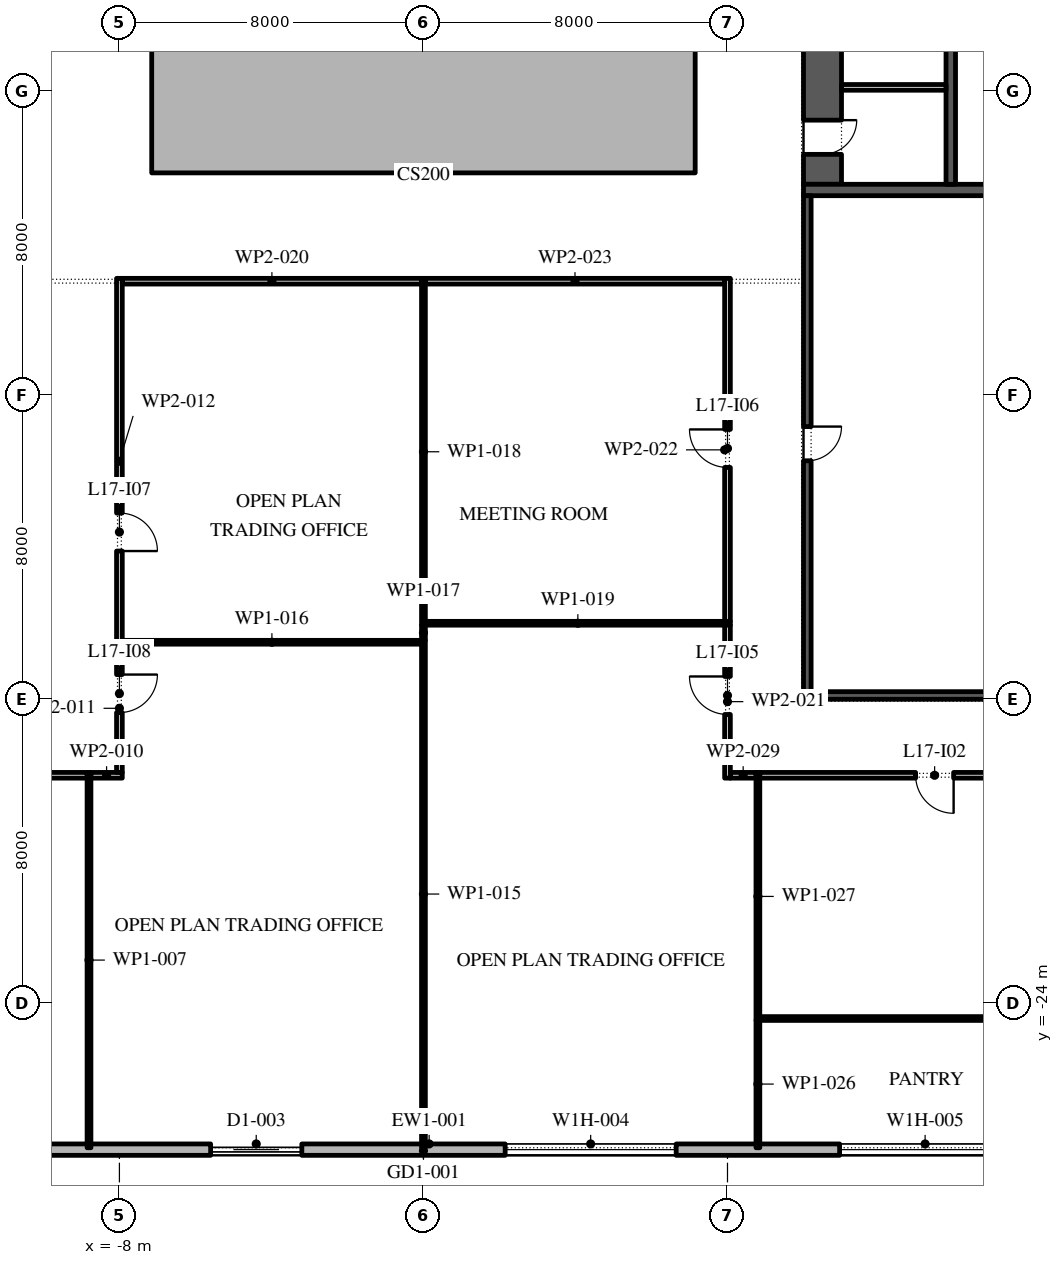
"""IFC4 building model, lengths in metres.
Left out: names, types, materials, properties, quantities, classifications, styles, units other than length and angle.
Written with IfcOpenShell. Run it as: python <this file> out.ifc"""

import sys

from ifc_helpers import new_model, si_unit, direction, frame, frame_2d, origin, place, context, subcontext, project, spatial, polyline, rectangle, outline, extrude, element, fill, save


model = new_model("IFC4")
c1 = context("Model", 3, precision=1e-05, world=origin(), true_north=direction((0.0, 1.0)))
c2 = subcontext(c1, "Body", "Model", "MODEL_VIEW")
j1 = project(units=[si_unit("LENGTHUNIT", "METRE"), si_unit("PLANEANGLEUNIT", "RADIAN")], contexts=[c1])
p1 = place(None, origin())
s1 = spatial("IfcSite", under=j1, at=p1, CompositionType="ELEMENT")
p2 = place(p1, origin())
s2 = spatial("IfcBuilding", under=s1, at=p2, CompositionType="ELEMENT")
p3 = place(p2, frame((0.0, 0.0, 81.6)))
s3 = spatial("IfcBuildingStorey", under=s2, at=p3, CompositionType="ELEMENT", Elevation=81.6)
p4 = place(p3, origin())
e1 = element("IfcWall", 1, at=p4, inside=s3, PredefinedType="STANDARD", context=c2, shape_type="SweptSolid", body=[
    extrude(outline(polyline([(-7.15, -2.15), (7.15, -2.15), (7.15, 16.15), (-7.15, 16.15), (-7.15, -2.15)]), holes=[polyline([(-7.0, -2.0), (-7.0, 16.0), (7.0, 16.0), (7.0, -2.0), (-7.0, -2.0)])]), origin(), (0.0, 0.0, 1.0), 4.0),
])
p5 = place(p3, frame((-26.1, -27.85, 0.0), z_axis=(0.0, 0.0, 1.0), x_axis=(1.0, 0.0, 0.0)))
e2 = element("IfcWall", 2, at=p5, inside=s3, PredefinedType="STANDARD", context=c2, shape_type="SweptSolid", body=[
    extrude(rectangle(XDim=52.5, YDim=0.3, at=frame_2d((26.25, 0.0))), origin(), (0.0, 0.0, 1.0), 4.0),
])
p6 = place(p5, frame((2.0, 0.0, 0.45)))
e3 = element("IfcOpeningElement", 3, at=p6, cuts=e2, PredefinedType="OPENING", context=c2, shape_type="SweptSolid", body=[
    extrude(rectangle(XDim=4.5, YDim=2.75, at=frame_2d((2.25, 1.375))), frame((0.0, 0.16, 0.0), z_axis=(0.0, -1.0, 0.0), x_axis=(1.0, 0.0, 0.0)), (0.0, 0.0, 1.0), 0.32),
])
p7 = place(p5, frame((10.65, 0.0, 0.45)))
e4 = element("IfcOpeningElement", 4, at=p7, cuts=e2, PredefinedType="OPENING", context=c2, shape_type="SweptSolid", body=[
    extrude(rectangle(XDim=4.5, YDim=2.75, at=frame_2d((2.25, 1.375))), frame((0.0, 0.16, 0.0), z_axis=(0.0, -1.0, 0.0), x_axis=(1.0, 0.0, 0.0)), (0.0, 0.0, 1.0), 0.32),
])
p8 = place(p5, frame((20.5, 0.0, 0.0)))
e5 = element("IfcOpeningElement", 5, at=p8, cuts=e2, PredefinedType="OPENING", context=c2, shape_type="SweptSolid", body=[
    extrude(rectangle(XDim=2.4, YDim=3.5, at=frame_2d((1.2, 1.75))), frame((0.0, 0.16, 0.0), z_axis=(0.0, -1.0, 0.0), x_axis=(1.0, 0.0, 0.0)), (0.0, 0.0, 1.0), 0.32),
])
p9 = place(p5, frame((28.25, 0.0, 0.45)))
e6 = element("IfcOpeningElement", 6, at=p9, cuts=e2, PredefinedType="OPENING", context=c2, shape_type="SweptSolid", body=[
    extrude(rectangle(XDim=4.5, YDim=2.75, at=frame_2d((2.25, 1.375))), frame((0.0, 0.16, 0.0), z_axis=(0.0, -1.0, 0.0), x_axis=(1.0, 0.0, 0.0)), (0.0, 0.0, 1.0), 0.32),
])
p10 = place(p5, frame((37.05, 0.0, 0.45)))
e7 = element("IfcOpeningElement", 7, at=p10, cuts=e2, PredefinedType="OPENING", context=c2, shape_type="SweptSolid", body=[
    extrude(rectangle(XDim=4.5, YDim=2.75, at=frame_2d((2.25, 1.375))), frame((0.0, 0.16, 0.0), z_axis=(0.0, -1.0, 0.0), x_axis=(1.0, 0.0, 0.0)), (0.0, 0.0, 1.0), 0.32),
])
p11 = place(p5, frame((45.85, 0.0, 0.45)))
e8 = element("IfcOpeningElement", 8, at=p11, cuts=e2, PredefinedType="OPENING", context=c2, shape_type="SweptSolid", body=[
    extrude(rectangle(XDim=4.5, YDim=2.75, at=frame_2d((2.25, 1.375))), frame((0.0, 0.16, 0.0), z_axis=(0.0, -1.0, 0.0), x_axis=(1.0, 0.0, 0.0)), (0.0, 0.0, 1.0), 0.32),
])
p12 = place(p3, frame((10.5, -2.45, 0.0), z_axis=(0.0, 0.0, 1.0), x_axis=(0.0, 1.0, 0.0)))
e9 = element("IfcWall", 9, at=p12, inside=s3, PredefinedType="SHEAR", context=c2, shape_type="SweptSolid", body=[
    extrude(rectangle(XDim=27.9, YDim=1.0, at=frame_2d((13.95, 0.0))), origin(), (0.0, 0.0, 1.0), 4.0),
])
p13 = place(p12, frame((23.65, 0.0, 0.0)))
e10 = element("IfcOpeningElement", 10, at=p13, cuts=e9, PredefinedType="OPENING", context=c2, shape_type="SweptSolid", body=[
    extrude(rectangle(XDim=2.4, YDim=2.1, at=frame_2d((1.2, 1.05))), frame((0.0, 0.51, 0.0), z_axis=(0.0, -1.0, 0.0), x_axis=(1.0, 0.0, 0.0)), (0.0, 0.0, 1.0), 1.02),
])
p14 = place(p12, frame((0.788, 0.0, 0.0)))
e11 = element("IfcOpeningElement", 11, at=p14, cuts=e9, PredefinedType="OPENING", context=c2, shape_type="SweptSolid", body=[
    extrude(rectangle(XDim=0.9, YDim=2.1, at=frame_2d((0.45, 1.05))), frame((0.0, 0.51, 0.0), z_axis=(0.0, -1.0, 0.0), x_axis=(1.0, 0.0, 0.0)), (0.0, 0.0, 1.0), 1.02),
])
p15 = place(p12, frame((4.012, 0.0, 0.0)))
e12 = element("IfcOpeningElement", 12, at=p15, cuts=e9, PredefinedType="OPENING", context=c2, shape_type="SweptSolid", body=[
    extrude(rectangle(XDim=0.9, YDim=2.1, at=frame_2d((0.45, 1.05))), frame((0.0, 0.51, 0.0), z_axis=(0.0, -1.0, 0.0), x_axis=(1.0, 0.0, 0.0)), (0.0, 0.0, 1.0), 1.02),
])
p16 = place(p3, frame((10.0, -2.6, 0.0), z_axis=(0.0, 0.0, 1.0), x_axis=(1.0, 0.0, 0.0)))
e13 = element("IfcWall", 13, at=p16, inside=s3, PredefinedType="SHEAR", context=c2, shape_type="SweptSolid", body=[
    extrude(rectangle(XDim=12.0, YDim=0.3, at=frame_2d((6.0, 0.0))), origin(), (0.0, 0.0, 1.0), 4.0),
])
p17 = place(p3, frame((13.875, -2.45, 0.0), z_axis=(0.0, 0.0, 1.0), x_axis=(0.0, 1.0, 0.0)))
e14 = element("IfcWall", 14, at=p17, inside=s3, PredefinedType="SHEAR", context=c2, shape_type="SweptSolid", body=[
    extrude(rectangle(XDim=21.3, YDim=0.25, at=frame_2d((10.65, 0.0))), origin(), (0.0, 0.0, 1.0), 4.0),
])
p18 = place(p17, frame((10.396, 0.0, 0.0)))
e15 = element("IfcOpeningElement", 15, at=p18, cuts=e14, PredefinedType="OPENING", context=c2, shape_type="SweptSolid", body=[
    extrude(rectangle(XDim=0.9, YDim=2.1, at=frame_2d((0.45, 1.05))), frame((0.0, 0.135, 0.0), z_axis=(0.0, -1.0, 0.0), x_axis=(1.0, 0.0, 0.0)), (0.0, 0.0, 1.0), 0.27),
])
p19 = place(p17, frame((14.6, 0.0, 0.0)))
e16 = element("IfcOpeningElement", 16, at=p19, cuts=e14, PredefinedType="OPENING", context=c2, shape_type="SweptSolid", body=[
    extrude(rectangle(XDim=0.9, YDim=2.1, at=frame_2d((0.45, 1.05))), frame((0.0, 0.135, 0.0), z_axis=(0.0, -1.0, 0.0), x_axis=(1.0, 0.0, 0.0)), (0.0, 0.0, 1.0), 0.27),
])
p20 = place(p17, frame((18.775, 0.0, 0.0)))
e17 = element("IfcOpeningElement", 17, at=p20, cuts=e14, PredefinedType="OPENING", context=c2, shape_type="SweptSolid", body=[
    extrude(rectangle(XDim=0.9, YDim=2.1, at=frame_2d((0.45, 1.05))), frame((0.0, 0.135, 0.0), z_axis=(0.0, -1.0, 0.0), x_axis=(1.0, 0.0, 0.0)), (0.0, 0.0, 1.0), 0.27),
])
p21 = place(p17, frame((6.971, 0.0, 0.0)))
e18 = element("IfcOpeningElement", 18, at=p21, cuts=e14, PredefinedType="OPENING", context=c2, shape_type="SweptSolid", body=[
    extrude(rectangle(XDim=1.1, YDim=2.1, at=frame_2d((0.55, 1.05))), frame((0.0, 0.135, 0.0), z_axis=(0.0, -1.0, 0.0), x_axis=(1.0, 0.0, 0.0)), (0.0, 0.0, 1.0), 0.27),
])
p22 = place(p3, frame((11.0, 0.1, 0.0), z_axis=(0.0, 0.0, 1.0), x_axis=(1.0, 0.0, 0.0)))
e19 = element("IfcWall", 19, at=p22, inside=s3, PredefinedType="PARTITIONING", context=c2, shape_type="SweptSolid", body=[
    extrude(rectangle(XDim=2.75, YDim=0.15, at=frame_2d((1.375, 0.0))), origin(), (0.0, 0.0, 1.0), 4.0),
])
p23 = place(p3, frame((10.1, -15.8, 0.0), z_axis=(0.0, 0.0, 1.0), x_axis=(0.0, 1.0, 0.0)))
e20 = element("IfcWall", 20, at=p23, inside=s3, PredefinedType="SHEAR", context=c2, shape_type="SweptSolid", body=[
    extrude(rectangle(XDim=13.05, YDim=0.2, at=frame_2d((6.525, 0.0))), origin(), (0.0, 0.0, 1.0), 4.0),
])
p24 = place(p23, frame((6.075, 0.0, 0.0)))
e21 = element("IfcOpeningElement", 21, at=p24, cuts=e20, PredefinedType="OPENING", context=c2, shape_type="SweptSolid", body=[
    extrude(rectangle(XDim=0.9, YDim=2.1, at=frame_2d((0.45, 1.05))), frame((0.0, 0.11, 0.0), z_axis=(0.0, -1.0, 0.0), x_axis=(1.0, 0.0, 0.0)), (0.0, 0.0, 1.0), 0.22),
])
p25 = place(p3, frame((10.0, -15.9, 0.0), z_axis=(0.0, 0.0, 1.0), x_axis=(1.0, 0.0, 0.0)))
e22 = element("IfcWall", 22, at=p25, inside=s3, PredefinedType="SHEAR", context=c2, shape_type="SweptSolid", body=[
    extrude(rectangle(XDim=12.0, YDim=0.2, at=frame_2d((6.0, 0.0))), origin(), (0.0, 0.0, 1.0), 4.0),
])
p26 = place(p3, frame((-8.8, -27.8, 0.0), z_axis=(0.0, 0.0, 1.0), x_axis=(0.0, 1.0, 0.0)))
e23 = element("IfcWall", 23, at=p26, inside=s3, PredefinedType="PARTITIONING", context=c2, shape_type="SweptSolid", body=[
    extrude(rectangle(XDim=9.875, YDim=0.1, at=frame_2d((4.938, 0.0))), origin(), (0.0, 0.0, 1.0), 4.0),
])
p27 = place(p3, frame((-8.85, -18.0, 0.0), z_axis=(0.0, 0.0, 1.0), x_axis=(-1.0, 0.0, 0.0)))
e24 = element("IfcWall", 24, at=p27, inside=s3, PredefinedType="PARTITIONING", context=c2, shape_type="SweptSolid", body=[
    extrude(rectangle(XDim=15.075, YDim=0.15, at=frame_2d((7.538, 0.0))), origin(), (0.0, 0.0, 1.0), 4.0),
])
p28 = place(p27, frame((6.7, 0.0, 0.0)))
e25 = element("IfcOpeningElement", 25, at=p28, cuts=e24, PredefinedType="OPENING", context=c2, shape_type="SweptSolid", body=[
    extrude(rectangle(XDim=1.8, YDim=2.1, at=frame_2d((0.9, 1.05))), frame((0.0, 0.085, 0.0), z_axis=(0.0, -1.0, 0.0), x_axis=(1.0, 0.0, 0.0)), (0.0, 0.0, 1.0), 0.17),
])
p29 = place(p3, frame((-7.925, -18.0, 0.0), z_axis=(0.0, 0.0, 1.0), x_axis=(-1.0, 0.0, 0.0)))
e26 = element("IfcWall", 26, at=p29, inside=s3, PredefinedType="PARTITIONING", context=c2, shape_type="SweptSolid", body=[
    extrude(rectangle(XDim=0.825, YDim=0.15, at=frame_2d((0.413, 0.0))), origin(), (0.0, 0.0, 1.0), 4.0),
])
p30 = place(p3, frame((-8.0, -14.55, 0.0), z_axis=(0.0, 0.0, 1.0), x_axis=(0.0, -1.0, 0.0)))
e27 = element("IfcWall", 27, at=p30, inside=s3, PredefinedType="PARTITIONING", context=c2, shape_type="SweptSolid", body=[
    extrude(rectangle(XDim=3.375, YDim=0.15, at=frame_2d((1.688, 0.0))), origin(), (0.0, 0.0, 1.0), 4.0),
])
p31 = place(p30, frame((0.8, 0.0, 0.0)))
e28 = element("IfcOpeningElement", 28, at=p31, cuts=e27, PredefinedType="OPENING", context=c2, shape_type="SweptSolid", body=[
    extrude(rectangle(XDim=1.0, YDim=2.1, at=frame_2d((0.5, 1.05))), frame((0.0, 0.085, 0.0), z_axis=(0.0, -1.0, 0.0), x_axis=(1.0, 0.0, 0.0)), (0.0, 0.0, 1.0), 0.17),
])
p32 = place(p3, frame((-8.0, -4.925, 0.0), z_axis=(0.0, 0.0, 1.0), x_axis=(0.0, -1.0, 0.0)))
e29 = element("IfcWall", 29, at=p32, inside=s3, PredefinedType="PARTITIONING", context=c2, shape_type="SweptSolid", body=[
    extrude(rectangle(XDim=9.625, YDim=0.15, at=frame_2d((4.812, 0.0))), origin(), (0.0, 0.0, 1.0), 4.0),
])
p33 = place(p32, frame((6.175, 0.0, 0.0)))
e30 = element("IfcOpeningElement", 30, at=p33, cuts=e29, PredefinedType="OPENING", context=c2, shape_type="SweptSolid", body=[
    extrude(rectangle(XDim=1.0, YDim=2.1, at=frame_2d((0.5, 1.05))), frame((0.0, 0.085, 0.0), z_axis=(0.0, -1.0, 0.0), x_axis=(1.0, 0.0, 0.0)), (0.0, 0.0, 1.0), 0.17),
])
p34 = place(p3, frame((0.0, -27.8, 0.0), z_axis=(0.0, 0.0, 1.0), x_axis=(0.0, 1.0, 0.0)))
e31 = element("IfcWall", 31, at=p34, inside=s3, PredefinedType="PARTITIONING", context=c2, shape_type="SweptSolid", body=[
    extrude(rectangle(XDim=13.35, YDim=0.1, at=frame_2d((6.675, 0.0))), origin(), (0.0, 0.0, 1.0), 4.0),
])
p35 = place(p3, frame((-0.05, -14.5, 0.0), z_axis=(0.0, 0.0, 1.0), x_axis=(-1.0, 0.0, 0.0)))
e32 = element("IfcWall", 32, at=p35, inside=s3, PredefinedType="PARTITIONING", context=c2, shape_type="SweptSolid", body=[
    extrude(rectangle(XDim=7.875, YDim=0.1, at=frame_2d((3.938, 0.0))), origin(), (0.0, 0.0, 1.0), 4.0),
])
p36 = place(p3, frame((0.0, -14.45, 0.0), z_axis=(0.0, 0.0, 1.0), x_axis=(0.0, 1.0, 0.0)))
e33 = element("IfcWall", 33, at=p36, inside=s3, PredefinedType="PARTITIONING", context=c2, shape_type="SweptSolid", body=[
    extrude(rectangle(XDim=0.4, YDim=0.1, at=frame_2d((0.2, 0.0))), origin(), (0.0, 0.0, 1.0), 4.0),
])
p37 = place(p3, frame((0.0, -14.05, 0.0), z_axis=(0.0, 0.0, 1.0), x_axis=(0.0, 1.0, 0.0)))
e34 = element("IfcWall", 34, at=p37, inside=s3, PredefinedType="PARTITIONING", context=c2, shape_type="SweptSolid", body=[
    extrude(rectangle(XDim=9.125, YDim=0.1, at=frame_2d((4.562, 0.0))), origin(), (0.0, 0.0, 1.0), 4.0),
])
p38 = place(p3, frame((0.05, -14.0, 0.0), z_axis=(0.0, 0.0, 1.0), x_axis=(1.0, 0.0, 0.0)))
e35 = element("IfcWall", 35, at=p38, inside=s3, PredefinedType="PARTITIONING", context=c2, shape_type="SweptSolid", body=[
    extrude(rectangle(XDim=8.025, YDim=0.1, at=frame_2d((4.012, 0.0))), origin(), (0.0, 0.0, 1.0), 4.0),
])
p39 = place(p3, frame((-0.05, -5.0, 0.0), z_axis=(0.0, 0.0, 1.0), x_axis=(-1.0, 0.0, 0.0)))
e36 = element("IfcWall", 36, at=p39, inside=s3, PredefinedType="PARTITIONING", context=c2, shape_type="SweptSolid", body=[
    extrude(rectangle(XDim=7.875, YDim=0.15, at=frame_2d((3.938, 0.0))), origin(), (0.0, 0.0, 1.0), 4.0),
])
p40 = place(p3, frame((8.0, -18.075, 0.0), z_axis=(0.0, 0.0, 1.0), x_axis=(0.0, 1.0, 0.0)))
e37 = element("IfcWall", 37, at=p40, inside=s3, PredefinedType="PARTITIONING", context=c2, shape_type="SweptSolid", body=[
    extrude(rectangle(XDim=4.025, YDim=0.15, at=frame_2d((2.012, 0.0))), origin(), (0.0, 0.0, 1.0), 4.0),
])
p41 = place(p40, frame((1.675, 0.0, 0.0)))
e38 = element("IfcOpeningElement", 38, at=p41, cuts=e37, PredefinedType="OPENING", context=c2, shape_type="SweptSolid", body=[
    extrude(rectangle(XDim=1.0, YDim=2.1, at=frame_2d((0.5, 1.05))), frame((0.0, 0.085, 0.0), z_axis=(0.0, -1.0, 0.0), x_axis=(1.0, 0.0, 0.0)), (0.0, 0.0, 1.0), 0.17),
])
p42 = place(p3, frame((8.0, -13.95, 0.0), z_axis=(0.0, 0.0, 1.0), x_axis=(0.0, 1.0, 0.0)))
e39 = element("IfcWall", 39, at=p42, inside=s3, PredefinedType="PARTITIONING", context=c2, shape_type="SweptSolid", body=[
    extrude(rectangle(XDim=9.025, YDim=0.15, at=frame_2d((4.512, 0.0))), origin(), (0.0, 0.0, 1.0), 4.0),
])
p43 = place(p42, frame((4.05, 0.0, 0.0)))
e40 = element("IfcOpeningElement", 40, at=p43, cuts=e39, PredefinedType="OPENING", context=c2, shape_type="SweptSolid", body=[
    extrude(rectangle(XDim=1.0, YDim=2.1, at=frame_2d((0.5, 1.05))), frame((0.0, 0.085, 0.0), z_axis=(0.0, -1.0, 0.0), x_axis=(1.0, 0.0, 0.0)), (0.0, 0.0, 1.0), 0.17),
])
p44 = place(p3, frame((7.925, -5.0, 0.0), z_axis=(0.0, 0.0, 1.0), x_axis=(-1.0, 0.0, 0.0)))
e41 = element("IfcWall", 41, at=p44, inside=s3, PredefinedType="PARTITIONING", context=c2, shape_type="SweptSolid", body=[
    extrude(rectangle(XDim=7.875, YDim=0.15, at=frame_2d((3.938, 0.0))), origin(), (0.0, 0.0, 1.0), 4.0),
])
p45 = place(p3, frame((8.8, -27.8, 0.0), z_axis=(0.0, 0.0, 1.0), x_axis=(0.0, 1.0, 0.0)))
e42 = element("IfcWall", 42, at=p45, inside=s3, PredefinedType="PARTITIONING", context=c2, shape_type="SweptSolid", body=[
    extrude(rectangle(XDim=3.35, YDim=0.1, at=frame_2d((1.675, 0.0))), origin(), (0.0, 0.0, 1.0), 4.0),
])
p46 = place(p3, frame((8.8, -24.45, 0.0), z_axis=(0.0, 0.0, 1.0), x_axis=(0.0, 1.0, 0.0)))
e43 = element("IfcWall", 43, at=p46, inside=s3, PredefinedType="PARTITIONING", context=c2, shape_type="SweptSolid", body=[
    extrude(rectangle(XDim=6.525, YDim=0.1, at=frame_2d((3.262, 0.0))), origin(), (0.0, 0.0, 1.0), 4.0),
])
p47 = place(p3, frame((8.85, -24.4, 0.0), z_axis=(0.0, 0.0, 1.0), x_axis=(1.0, 0.0, 0.0)))
e44 = element("IfcWall", 44, at=p47, inside=s3, PredefinedType="PARTITIONING", context=c2, shape_type="SweptSolid", body=[
    extrude(rectangle(XDim=17.56, YDim=0.1, at=frame_2d((8.78, 0.0))), origin(), (0.0, 0.0, 1.0), 4.0),
])
p48 = place(p47, frame((6.65, 0.0, 0.0)))
e45 = element("IfcOpeningElement", 45, at=p48, cuts=e44, PredefinedType="OPENING", context=c2, shape_type="SweptSolid", body=[
    extrude(rectangle(XDim=0.9, YDim=2.1, at=frame_2d((0.45, 1.05))), frame((0.0, 0.06, 0.0), z_axis=(0.0, -1.0, 0.0), x_axis=(1.0, 0.0, 0.0)), (0.0, 0.0, 1.0), 0.12),
])
p49 = place(p3, frame((8.75, -18.0, 0.0), z_axis=(0.0, 0.0, 1.0), x_axis=(-1.0, 0.0, 0.0)))
e46 = element("IfcWall", 46, at=p49, inside=s3, PredefinedType="PARTITIONING", context=c2, shape_type="SweptSolid", body=[
    extrude(rectangle(XDim=0.675, YDim=0.15, at=frame_2d((0.337, 0.0))), origin(), (0.0, 0.0, 1.0), 4.0),
])
p50 = place(p3, frame((24.075, -18.0, 0.0), z_axis=(0.0, 0.0, 1.0), x_axis=(-1.0, 0.0, 0.0)))
e47 = element("IfcWall", 47, at=p50, inside=s3, PredefinedType="PARTITIONING", context=c2, shape_type="SweptSolid", body=[
    extrude(rectangle(XDim=15.225, YDim=0.15, at=frame_2d((7.612, 0.0))), origin(), (0.0, 0.0, 1.0), 4.0),
])
p51 = place(p50, frame((10.125, 0.0, 0.0)))
e48 = element("IfcOpeningElement", 48, at=p51, cuts=e47, PredefinedType="OPENING", context=c2, shape_type="SweptSolid", body=[
    extrude(rectangle(XDim=1.0, YDim=2.1, at=frame_2d((0.5, 1.05))), frame((0.0, 0.085, 0.0), z_axis=(0.0, -1.0, 0.0), x_axis=(1.0, 0.0, 0.0)), (0.0, 0.0, 1.0), 0.17),
])
p52 = place(p8, origin())
e49 = element("IfcDoor", 49, at=p52, inside=s3, OperationType="DOUBLE_DOOR_SLIDING", PredefinedType="DOOR", context=c2, shape_type="SweptSolid", body=[
    extrude(rectangle(XDim=2.4, YDim=3.5, at=frame_2d((1.2, 1.75))), frame((0.0, 0.025, 0.0), z_axis=(0.0, -1.0, 0.0), x_axis=(1.0, 0.0, 0.0)), (0.0, 0.0, 1.0), 0.05),
])
fill(e5, e49)
p53 = place(p9, origin())
e50 = element("IfcWindow", 50, at=p53, inside=s3, PartitioningType="DOUBLE_PANEL_VERTICAL", PredefinedType="WINDOW", context=c2, shape_type="SweptSolid", body=[
    extrude(rectangle(XDim=4.5, YDim=2.75, at=frame_2d((2.25, 1.375))), frame((0.0, 0.03, 0.0), z_axis=(0.0, -1.0, 0.0), x_axis=(1.0, 0.0, 0.0)), (0.0, 0.0, 1.0), 0.06),
])
fill(e6, e50)
p54 = place(p10, origin())
e51 = element("IfcWindow", 51, at=p54, inside=s3, PartitioningType="DOUBLE_PANEL_VERTICAL", PredefinedType="WINDOW", context=c2, shape_type="SweptSolid", body=[
    extrude(rectangle(XDim=4.5, YDim=2.75, at=frame_2d((2.25, 1.375))), frame((0.0, 0.03, 0.0), z_axis=(0.0, -1.0, 0.0), x_axis=(1.0, 0.0, 0.0)), (0.0, 0.0, 1.0), 0.06),
])
fill(e7, e51)
p55 = place(p14, frame((0.9, -0.95, 0.0), z_axis=(0.0, 0.0, 1.0), x_axis=(-1.0, 0.0, 0.0)))
e52 = element("IfcDoor", 52, at=p55, inside=s3, OperationType="SINGLE_SWING_RIGHT", PredefinedType="DOOR", context=c2, shape_type="SweptSolid", body=[
    extrude(rectangle(XDim=0.9, YDim=2.1, at=frame_2d((0.45, 1.05))), frame((0.0, -0.45, 0.0), z_axis=(0.0, -1.0, 0.0), x_axis=(1.0, 0.0, 0.0)), (0.0, 0.0, 1.0), 0.05),
])
fill(e11, e52)
p56 = place(p24, frame((0.9, -0.15, 0.0), z_axis=(0.0, 0.0, 1.0), x_axis=(-1.0, 0.0, 0.0)))
e53 = element("IfcDoor", 53, at=p56, inside=s3, OperationType="SINGLE_SWING_RIGHT", PredefinedType="DOOR", context=c2, shape_type="SweptSolid", body=[
    extrude(rectangle(XDim=0.9, YDim=2.1, at=frame_2d((0.45, 1.05))), frame((0.0, -0.05, 0.0), z_axis=(0.0, -1.0, 0.0), x_axis=(1.0, 0.0, 0.0)), (0.0, 0.0, 1.0), 0.05),
])
fill(e21, e53)
p57 = place(p51, origin())
e54 = element("IfcDoor", 54, at=p57, inside=s3, OperationType="SINGLE_SWING_RIGHT", PredefinedType="DOOR", context=c2, shape_type="SweptSolid", body=[
    extrude(rectangle(XDim=1.0, YDim=2.1, at=frame_2d((0.5, 1.05))), frame((0.0, 0.025, 0.0), z_axis=(0.0, -1.0, 0.0), x_axis=(1.0, 0.0, 0.0)), (0.0, 0.0, 1.0), 0.05),
])
fill(e48, e54)
p58 = place(p41, origin())
e55 = element("IfcDoor", 55, at=p58, inside=s3, OperationType="SINGLE_SWING_LEFT", PredefinedType="DOOR", context=c2, shape_type="SweptSolid", body=[
    extrude(rectangle(XDim=1.0, YDim=2.1, at=frame_2d((0.5, 1.05))), frame((0.0, 0.025, 0.0), z_axis=(0.0, -1.0, 0.0), x_axis=(1.0, 0.0, 0.0)), (0.0, 0.0, 1.0), 0.05),
])
fill(e38, e55)
p59 = place(p43, origin())
e56 = element("IfcDoor", 56, at=p59, inside=s3, OperationType="SINGLE_SWING_LEFT", PredefinedType="DOOR", context=c2, shape_type="SweptSolid", body=[
    extrude(rectangle(XDim=1.0, YDim=2.1, at=frame_2d((0.5, 1.05))), frame((0.0, 0.025, 0.0), z_axis=(0.0, -1.0, 0.0), x_axis=(1.0, 0.0, 0.0)), (0.0, 0.0, 1.0), 0.05),
])
fill(e40, e56)
p60 = place(p33, origin())
e57 = element("IfcDoor", 57, at=p60, inside=s3, OperationType="SINGLE_SWING_LEFT", PredefinedType="DOOR", context=c2, shape_type="SweptSolid", body=[
    extrude(rectangle(XDim=1.0, YDim=2.1, at=frame_2d((0.5, 1.05))), frame((0.0, 0.025, 0.0), z_axis=(0.0, -1.0, 0.0), x_axis=(1.0, 0.0, 0.0)), (0.0, 0.0, 1.0), 0.05),
])
fill(e30, e57)
p61 = place(p31, origin())
e58 = element("IfcDoor", 58, at=p61, inside=s3, OperationType="SINGLE_SWING_RIGHT", PredefinedType="DOOR", context=c2, shape_type="SweptSolid", body=[
    extrude(rectangle(XDim=1.0, YDim=2.1, at=frame_2d((0.5, 1.05))), frame((0.0, 0.025, 0.0), z_axis=(0.0, -1.0, 0.0), x_axis=(1.0, 0.0, 0.0)), (0.0, 0.0, 1.0), 0.05),
])
fill(e28, e58)
save(model, sys.argv[1])
